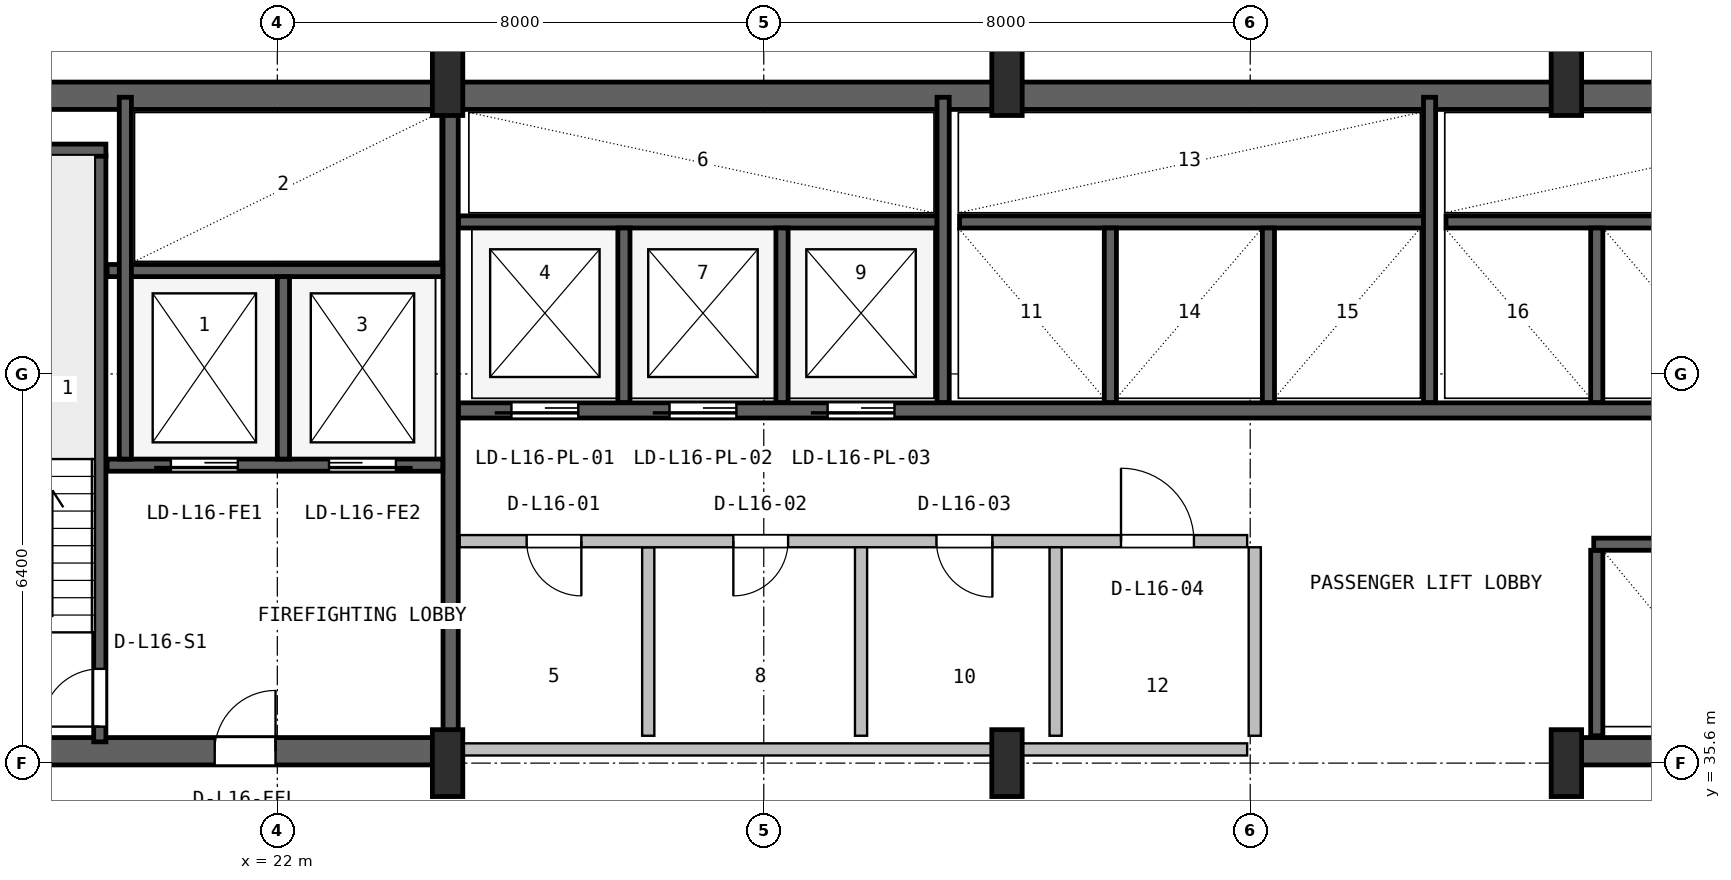
"""IFC4 building model, lengths in metres.
Left out: names, types, materials, properties, quantities, classifications, styles, units other than length and angle.
Written with IfcOpenShell. Run it as: python <this file> out.ifc"""

import sys

from ifc_helpers import new_model, si_unit, direction, frame, frame_2d, origin, origin_2d, place, context, subcontext, project, spatial, rectangle, i_section, extrude, source, transform, mapped, element, fill, save


model = new_model("IFC4")
c1 = context("Model", 3, precision=1e-05, world=origin(), true_north=direction((0.0, 1.0)))
c2 = subcontext(c1, "Body", "Model", "MODEL_VIEW")
j1 = project(units=[si_unit("LENGTHUNIT", "METRE"), si_unit("PLANEANGLEUNIT", "RADIAN")], contexts=[c1])
p1 = place(None, origin())
s1 = spatial("IfcSite", under=j1, at=p1, CompositionType="ELEMENT")
p2 = place(p1, origin())
s2 = spatial("IfcBuilding", under=s1, at=p2, CompositionType="ELEMENT")
p3 = place(p2, frame((0.0, 0.0, 70.5)))
s3 = spatial("IfcBuildingStorey", under=s2, at=p3, CompositionType="ELEMENT", Elevation=70.5)
p4 = place(p3, frame((15.6, 46.575, 0.0), z_axis=(0.0, 0.0, 1.0), x_axis=(1.0, 0.0, 0.0)))
e1 = element("IfcWall", 1, at=p4, inside=s3, PredefinedType="SHEAR", context=c2, shape_type="SweptSolid", body=[
    extrude(rectangle(XDim=36.8, YDim=0.45, at=frame_2d((18.4, 0.0))), origin(), (0.0, 0.0, 1.0), 3.65),
])
p5 = place(p3, frame((15.57, 35.795, 0.0), z_axis=(0.0, 0.0, 1.0), x_axis=(1.0, 0.0, 0.0)))
e2 = element("IfcWall", 2, at=p5, inside=s3, PredefinedType="SHEAR", context=c2, shape_type="SweptSolid", body=[
    extrude(rectangle(XDim=9.23, YDim=0.45, at=frame_2d((4.615, 0.0))), origin(), (0.0, 0.0, 1.0), 3.65),
])
p6 = place(p5, frame((5.4, 0.0, 0.0)))
e3 = element("IfcOpeningElement", 3, at=p6, cuts=e2, PredefinedType="OPENING", context=c2, shape_type="SweptSolid", body=[
    extrude(rectangle(XDim=1.0, YDim=2.1, at=frame_2d((0.5, 1.05))), frame((0.0, 0.235, 0.0), z_axis=(0.0, -1.0, 0.0), x_axis=(1.0, 0.0, 0.0)), (0.0, 0.0, 1.0), 0.47),
])
p7 = place(p3, frame((43.2, 35.795, 0.0), z_axis=(0.0, 0.0, 1.0), x_axis=(1.0, 0.0, 0.0)))
e4 = element("IfcWall", 4, at=p7, inside=s3, PredefinedType="SHEAR", context=c2, shape_type="SweptSolid", body=[
    extrude(rectangle(XDim=9.23, YDim=0.45, at=frame_2d((4.615, 0.0))), origin(), (0.0, 0.0, 1.0), 3.65),
])
p8 = place(p7, frame((6.25, 0.0, 0.0)))
e5 = element("IfcOpeningElement", 5, at=p8, cuts=e4, PredefinedType="OPENING", context=c2, shape_type="SweptSolid", body=[
    extrude(rectangle(XDim=0.95, YDim=2.1, at=frame_2d((0.475, 1.05))), frame((0.0, 0.235, 0.0), z_axis=(0.0, -1.0, 0.0), x_axis=(1.0, 0.0, 0.0)), (0.0, 0.0, 1.0), 0.47),
])
m1 = source(origin(), c2, "Body", "SweptSolid", [
    extrude(i_section(OverallWidth=0.5, OverallDepth=1.1, WebThickness=0.018, FlangeThickness=0.032, FilletRadius=0.018, at=origin_2d()), origin(), (0.0, 0.0, 1.0), 3.9),
])
for number, where, z_axis, x_axis in (
    (6, (24.8, 35.6, 0.0), (0.0, 0.0, 1.0), (1.0, 0.0, 0.0)),
    (7, (24.8, 46.8, 0.0), (0.0, 0.0, 1.0), (1.0, 0.0, 0.0)),
    (8, (34.0, 35.6, 0.0), (0.0, 0.0, 1.0), (1.0, 0.0, 0.0)),
    (9, (34.0, 46.8, 0.0), (0.0, 0.0, 1.0), (1.0, 0.0, 0.0)),
    (10, (43.2, 35.6, 0.0), (0.0, 0.0, 1.0), (1.0, 0.0, 0.0)),
    (11, (43.2, 46.8, 0.0), (0.0, 0.0, 1.0), (1.0, 0.0, 0.0)),
):
    element("IfcColumn", number, at=place(p3, frame(where, z_axis=z_axis, x_axis=x_axis)), inside=s3, PredefinedType="COLUMN", context=c2, shape_type="MappedRepresentation", body=[
        mapped(m1, transform((0.0, 0.0, 0.0), x_axis=(1.0, 0.0, 0.0), y_axis=(0.0, 1.0, 0.0), z_axis=(0.0, 0.0, 1.0), scale=1.0)),
    ])
p9 = place(p3, frame((19.08, 35.95, 0.0), z_axis=(0.0, 0.0, 1.0), x_axis=(0.0, 1.0, 0.0)))
e12 = element("IfcWall", 12, at=p9, inside=s3, PredefinedType="SHEAR", context=c2, shape_type="SweptSolid", body=[
    extrude(rectangle(XDim=9.65, YDim=0.2, at=frame_2d((4.825, 0.0))), origin(), (0.0, 0.0, 1.0), 3.65),
])
p10 = place(p9, frame((0.25, 0.0, 0.0)))
e13 = element("IfcOpeningElement", 13, at=p10, cuts=e12, PredefinedType="OPENING", context=c2, shape_type="SweptSolid", body=[
    extrude(rectangle(XDim=0.95, YDim=2.1, at=frame_2d((0.475, 1.05))), frame((0.0, 0.11, 0.0), z_axis=(0.0, -1.0, 0.0), x_axis=(1.0, 0.0, 0.0)), (0.0, 0.0, 1.0), 0.22),
])
p11 = place(p3, frame((15.95, 45.68, 0.0), z_axis=(0.0, 0.0, 1.0), x_axis=(1.0, 0.0, 0.0)))
e14 = element("IfcWall", 14, at=p11, inside=s3, PredefinedType="SHEAR", context=c2, shape_type="SweptSolid", body=[
    extrude(rectangle(XDim=3.23, YDim=0.2, at=frame_2d((1.615, 0.0))), origin(), (0.0, 0.0, 1.0), 3.65),
])
p12 = place(p3, frame((24.85, 36.05, 0.0), z_axis=(0.0, 0.0, 1.0), x_axis=(0.0, 1.0, 0.0)))
e15 = element("IfcWall", 15, at=p12, inside=s3, PredefinedType="SHEAR", context=c2, shape_type="SweptSolid", body=[
    extrude(rectangle(XDim=10.45, YDim=0.25, at=frame_2d((5.225, 0.0))), origin(), (0.0, 0.0, 1.0), 3.65),
])
p13 = place(p3, frame((19.2, 40.5, 0.0), z_axis=(0.0, 0.0, 1.0), x_axis=(1.0, 0.0, 0.0)))
e16 = element("IfcWall", 16, at=p13, inside=s3, PredefinedType="SHEAR", context=c2, shape_type="SweptSolid", body=[
    extrude(rectangle(XDim=5.52, YDim=0.2, at=frame_2d((2.76, 0.0))), origin(), (0.0, 0.0, 1.0), 3.65),
])
p14 = place(p13, frame((1.05, 0.0, 0.0)))
e17 = element("IfcOpeningElement", 17, at=p14, cuts=e16, PredefinedType="OPENING", context=c2, shape_type="SweptSolid", body=[
    extrude(rectangle(XDim=1.1, YDim=2.18, at=frame_2d((0.55, 1.09))), frame((0.0, 0.11, 0.0), z_axis=(0.0, -1.0, 0.0), x_axis=(1.0, 0.0, 0.0)), (0.0, 0.0, 1.0), 0.22),
])
p15 = place(p13, frame((3.65, 0.0, 0.0)))
e18 = element("IfcOpeningElement", 18, at=p15, cuts=e16, PredefinedType="OPENING", context=c2, shape_type="SweptSolid", body=[
    extrude(rectangle(XDim=1.1, YDim=2.18, at=frame_2d((0.55, 1.09))), frame((0.0, 0.11, 0.0), z_axis=(0.0, -1.0, 0.0), x_axis=(1.0, 0.0, 0.0)), (0.0, 0.0, 1.0), 0.22),
])
p16 = place(p3, frame((19.2, 43.7, 0.0), z_axis=(0.0, 0.0, 1.0), x_axis=(1.0, 0.0, 0.0)))
e19 = element("IfcWall", 19, at=p16, inside=s3, PredefinedType="SHEAR", context=c2, shape_type="SweptSolid", body=[
    extrude(rectangle(XDim=5.52, YDim=0.2, at=frame_2d((2.76, 0.0))), origin(), (0.0, 0.0, 1.0), 3.65),
])
p17 = place(p3, frame((22.1, 40.6, 0.0), z_axis=(0.0, 0.0, 1.0), x_axis=(0.0, 1.0, 0.0)))
e20 = element("IfcWall", 20, at=p17, inside=s3, PredefinedType="SHEAR", context=c2, shape_type="SweptSolid", body=[
    extrude(rectangle(XDim=3.0, YDim=0.2, at=frame_2d((1.5, 0.0))), origin(), (0.0, 0.0, 1.0), 3.65),
])
p18 = place(p3, frame((19.5, 40.6, 0.0), z_axis=(0.0, 0.0, 1.0), x_axis=(0.0, 1.0, 0.0)))
e21 = element("IfcWall", 21, at=p18, inside=s3, PredefinedType="SHEAR", context=c2, shape_type="SweptSolid", body=[
    extrude(rectangle(XDim=5.95, YDim=0.2, at=frame_2d((2.975, 0.0))), origin(), (0.0, 0.0, 1.0), 3.65),
])
p19 = place(p3, frame((24.98, 41.4, 0.0), z_axis=(0.0, 0.0, 1.0), x_axis=(1.0, 0.0, 0.0)))
e22 = element("IfcWall", 22, at=p19, inside=s3, PredefinedType="SHEAR", context=c2, shape_type="SweptSolid", body=[
    extrude(rectangle(XDim=23.82, YDim=0.25, at=frame_2d((11.91, 0.0))), origin(), (0.0, 0.0, 1.0), 3.65),
])
p20 = place(p19, frame((0.87, 0.0, 0.0)))
e23 = element("IfcOpeningElement", 23, at=p20, cuts=e22, PredefinedType="OPENING", context=c2, shape_type="SweptSolid", body=[
    extrude(rectangle(XDim=1.1, YDim=2.18, at=frame_2d((0.55, 1.09))), frame((0.0, 0.135, 0.0), z_axis=(0.0, -1.0, 0.0), x_axis=(1.0, 0.0, 0.0)), (0.0, 0.0, 1.0), 0.27),
])
p21 = place(p19, frame((3.47, 0.0, 0.0)))
e24 = element("IfcOpeningElement", 24, at=p21, cuts=e22, PredefinedType="OPENING", context=c2, shape_type="SweptSolid", body=[
    extrude(rectangle(XDim=1.1, YDim=2.18, at=frame_2d((0.55, 1.09))), frame((0.0, 0.135, 0.0), z_axis=(0.0, -1.0, 0.0), x_axis=(1.0, 0.0, 0.0)), (0.0, 0.0, 1.0), 0.27),
])
p22 = place(p19, frame((6.07, 0.0, 0.0)))
e25 = element("IfcOpeningElement", 25, at=p22, cuts=e22, PredefinedType="OPENING", context=c2, shape_type="SweptSolid", body=[
    extrude(rectangle(XDim=1.1, YDim=2.18, at=frame_2d((0.55, 1.09))), frame((0.0, 0.135, 0.0), z_axis=(0.0, -1.0, 0.0), x_axis=(1.0, 0.0, 0.0)), (0.0, 0.0, 1.0), 0.27),
])
p23 = place(p3, frame((24.98, 44.5, 0.0), z_axis=(0.0, 0.0, 1.0), x_axis=(1.0, 0.0, 0.0)))
e26 = element("IfcWall", 26, at=p23, inside=s3, PredefinedType="SHEAR", context=c2, shape_type="SweptSolid", body=[
    extrude(rectangle(XDim=7.87, YDim=0.2, at=frame_2d((3.935, 0.0))), origin(), (0.0, 0.0, 1.0), 3.65),
])
for number, where, z_axis, x_axis in (
    (27, (27.7, 41.53, 0.0), (0.0, 0.0, 1.0), (0.0, 1.0, 0.0)),
    (28, (30.3, 41.53, 0.0), (0.0, 0.0, 1.0), (0.0, 1.0, 0.0)),
):
    element("IfcWall", number, at=place(p3, frame(where, z_axis=z_axis, x_axis=x_axis)), inside=s3, PredefinedType="SHEAR", context=c2, shape_type="SweptSolid", body=[
        extrude(rectangle(XDim=2.87, YDim=0.2, at=frame_2d((1.435, 0.0))), origin(), (0.0, 0.0, 1.0), 3.65),
    ])
p24 = place(p3, frame((32.95, 41.53, 0.0), z_axis=(0.0, 0.0, 1.0), x_axis=(0.0, 1.0, 0.0)))
e29 = element("IfcWall", 29, at=p24, inside=s3, PredefinedType="SHEAR", context=c2, shape_type="SweptSolid", body=[
    extrude(rectangle(XDim=5.02, YDim=0.2, at=frame_2d((2.51, 0.0))), origin(), (0.0, 0.0, 1.0), 3.65),
])
p25 = place(p3, frame((33.22, 44.5, 0.0), z_axis=(0.0, 0.0, 1.0), x_axis=(1.0, 0.0, 0.0)))
e30 = element("IfcWall", 30, at=p25, inside=s3, PredefinedType="SHEAR", context=c2, shape_type="SweptSolid", body=[
    extrude(rectangle(XDim=7.63, YDim=0.2, at=frame_2d((3.815, 0.0))), origin(), (0.0, 0.0, 1.0), 3.65),
])
for number, where, z_axis, x_axis in (
    (31, (35.7, 41.53, 0.0), (0.0, 0.0, 1.0), (0.0, 1.0, 0.0)),
    (32, (38.3, 41.53, 0.0), (0.0, 0.0, 1.0), (0.0, 1.0, 0.0)),
):
    element("IfcWall", number, at=place(p3, frame(where, z_axis=z_axis, x_axis=x_axis)), inside=s3, PredefinedType="SHEAR", context=c2, shape_type="SweptSolid", body=[
        extrude(rectangle(XDim=2.87, YDim=0.2, at=frame_2d((1.435, 0.0))), origin(), (0.0, 0.0, 1.0), 3.65),
    ])
p26 = place(p3, frame((40.95, 41.53, 0.0), z_axis=(0.0, 0.0, 1.0), x_axis=(0.0, 1.0, 0.0)))
e33 = element("IfcWall", 33, at=p26, inside=s3, PredefinedType="SHEAR", context=c2, shape_type="SweptSolid", body=[
    extrude(rectangle(XDim=5.02, YDim=0.2, at=frame_2d((2.51, 0.0))), origin(), (0.0, 0.0, 1.0), 3.65),
])
p27 = place(p3, frame((41.22, 44.5, 0.0), z_axis=(0.0, 0.0, 1.0), x_axis=(1.0, 0.0, 0.0)))
e34 = element("IfcWall", 34, at=p27, inside=s3, PredefinedType="SHEAR", context=c2, shape_type="SweptSolid", body=[
    extrude(rectangle(XDim=7.58, YDim=0.2, at=frame_2d((3.79, 0.0))), origin(), (0.0, 0.0, 1.0), 3.65),
])
p28 = place(p3, frame((43.7, 41.53, 0.0), z_axis=(0.0, 0.0, 1.0), x_axis=(0.0, 1.0, 0.0)))
e35 = element("IfcWall", 35, at=p28, inside=s3, PredefinedType="SHEAR", context=c2, shape_type="SweptSolid", body=[
    extrude(rectangle(XDim=2.87, YDim=0.2, at=frame_2d((1.435, 0.0))), origin(), (0.0, 0.0, 1.0), 3.65),
])
p29 = place(p3, frame((43.7, 36.05, 0.0), z_axis=(0.0, 0.0, 1.0), x_axis=(0.0, 1.0, 0.0)))
e36 = element("IfcWall", 36, at=p29, inside=s3, PredefinedType="SHEAR", context=c2, shape_type="SweptSolid", body=[
    extrude(rectangle(XDim=3.05, YDim=0.2, at=frame_2d((1.525, 0.0))), origin(), (0.0, 0.0, 1.0), 3.65),
])
p30 = place(p3, frame((43.65, 39.2, 0.0), z_axis=(0.0, 0.0, 1.0), x_axis=(1.0, 0.0, 0.0)))
e37 = element("IfcWall", 37, at=p30, inside=s3, PredefinedType="SHEAR", context=c2, shape_type="SweptSolid", body=[
    extrude(rectangle(XDim=5.15, YDim=0.2, at=frame_2d((2.575, 0.0))), origin(), (0.0, 0.0, 1.0), 3.65),
])
p31 = place(p3, frame((25.0, 35.825, 0.0), z_axis=(0.0, 0.0, 1.0), x_axis=(1.0, 0.0, 0.0)))
e38 = element("IfcWall", 38, at=p31, inside=s3, PredefinedType="SOLIDWALL", context=c2, shape_type="SweptSolid", body=[
    extrude(rectangle(XDim=12.95, YDim=0.2, at=frame_2d((6.475, 0.0))), origin(), (0.0, 0.0, 1.0), 2.425),
])
p32 = place(p3, frame((28.1, 36.05, 0.0), z_axis=(0.0, 0.0, 1.0), x_axis=(0.0, 1.0, 0.0)))
e39 = element("IfcWall", 39, at=p32, inside=s3, PredefinedType="PLUMBINGWALL", context=c2, shape_type="SweptSolid", body=[
    extrude(rectangle(XDim=3.1, YDim=0.2, at=frame_2d((1.55, 0.0))), origin(), (0.0, 0.0, 1.0), 3.63),
])
p33 = place(p3, frame((25.0, 39.25, 0.0), z_axis=(0.0, 0.0, 1.0), x_axis=(1.0, 0.0, 0.0)))
e40 = element("IfcWall", 40, at=p33, inside=s3, PredefinedType="SOLIDWALL", context=c2, shape_type="SweptSolid", body=[
    extrude(rectangle(XDim=12.95, YDim=0.2, at=frame_2d((6.475, 0.0))), origin(), (0.0, 0.0, 1.0), 3.63),
])
p34 = place(p33, frame((1.1, 0.0, 0.0)))
e41 = element("IfcOpeningElement", 41, at=p34, cuts=e40, PredefinedType="OPENING", context=c2, shape_type="SweptSolid", body=[
    extrude(rectangle(XDim=0.9, YDim=2.06, at=frame_2d((0.45, 1.03))), frame((0.0, 0.11, 0.0), z_axis=(0.0, -1.0, 0.0), x_axis=(1.0, 0.0, 0.0)), (0.0, 0.0, 1.0), 0.22),
])
p35 = place(p33, frame((4.5, 0.0, 0.0)))
e42 = element("IfcOpeningElement", 42, at=p35, cuts=e40, PredefinedType="OPENING", context=c2, shape_type="SweptSolid", body=[
    extrude(rectangle(XDim=0.9, YDim=2.06, at=frame_2d((0.45, 1.03))), frame((0.0, 0.11, 0.0), z_axis=(0.0, -1.0, 0.0), x_axis=(1.0, 0.0, 0.0)), (0.0, 0.0, 1.0), 0.22),
])
p36 = place(p33, frame((7.84, 0.0, 0.0)))
e43 = element("IfcOpeningElement", 43, at=p36, cuts=e40, PredefinedType="OPENING", context=c2, shape_type="SweptSolid", body=[
    extrude(rectangle(XDim=0.92, YDim=2.08, at=frame_2d((0.46, 1.04))), frame((0.0, 0.11, 0.0), z_axis=(0.0, -1.0, 0.0), x_axis=(1.0, 0.0, 0.0)), (0.0, 0.0, 1.0), 0.22),
])
p37 = place(p33, frame((10.875, 0.0, 0.0)))
e44 = element("IfcOpeningElement", 44, at=p37, cuts=e40, PredefinedType="OPENING", context=c2, shape_type="SweptSolid", body=[
    extrude(rectangle(XDim=1.2, YDim=2.1, at=frame_2d((0.6, 1.05))), frame((0.0, 0.11, 0.0), z_axis=(0.0, -1.0, 0.0), x_axis=(1.0, 0.0, 0.0)), (0.0, 0.0, 1.0), 0.22),
])
p38 = place(p3, frame((31.6, 36.05, 0.0), z_axis=(0.0, 0.0, 1.0), x_axis=(0.0, 1.0, 0.0)))
e45 = element("IfcWall", 45, at=p38, inside=s3, PredefinedType="PLUMBINGWALL", context=c2, shape_type="SweptSolid", body=[
    extrude(rectangle(XDim=3.1, YDim=0.2, at=frame_2d((1.55, 0.0))), origin(), (0.0, 0.0, 1.0), 3.63),
])
for number, where, z_axis, x_axis in (
    (46, (34.8, 36.05, 0.0), (0.0, 0.0, 1.0), (0.0, 1.0, 0.0)),
    (47, (38.075, 36.05, 0.0), (0.0, 0.0, 1.0), (0.0, 1.0, 0.0)),
):
    element("IfcWall", number, at=place(p3, frame(where, z_axis=z_axis, x_axis=x_axis)), inside=s3, PredefinedType="SOLIDWALL", context=c2, shape_type="SweptSolid", body=[
        extrude(rectangle(XDim=3.1, YDim=0.2, at=frame_2d((1.55, 0.0))), origin(), (0.0, 0.0, 1.0), 3.63),
    ])
m2 = source(origin(), c2, "Body", "SweptSolid", [
    extrude(rectangle(XDim=0.95, YDim=2.1, at=frame_2d((0.475, 1.05))), frame((0.0, 0.025, 0.0), z_axis=(0.0, -1.0, 0.0), x_axis=(1.0, 0.0, 0.0)), (0.0, 0.0, 1.0), 0.05),
])
p39 = place(p10, origin())
e48 = element("IfcDoor", 48, at=p39, inside=s3, OperationType="SINGLE_SWING_LEFT", PredefinedType="DOOR", context=c2, shape_type="MappedRepresentation", body=[
    mapped(m2, transform((0.0, 0.0, 0.0), x_axis=(1.0, 0.0, 0.0), y_axis=(0.0, 1.0, 0.0), z_axis=(0.0, 0.0, 1.0), scale=1.0)),
])
fill(e13, e48)
m3 = source(origin(), c2, "Body", "SweptSolid", [
    extrude(rectangle(XDim=1.0, YDim=2.1, at=frame_2d((0.5, 1.05))), frame((0.0, 0.025, 0.0), z_axis=(0.0, -1.0, 0.0), x_axis=(1.0, 0.0, 0.0)), (0.0, 0.0, 1.0), 0.05),
])
p40 = place(p6, origin())
e49 = element("IfcDoor", 49, at=p40, inside=s3, OperationType="SINGLE_SWING_RIGHT", PredefinedType="DOOR", context=c2, shape_type="MappedRepresentation", body=[
    mapped(m3, transform((0.0, 0.0, 0.0), x_axis=(1.0, 0.0, 0.0), y_axis=(0.0, 1.0, 0.0), z_axis=(0.0, 0.0, 1.0), scale=1.0)),
])
fill(e3, e49)
m4 = source(origin(), c2, "Body", "SweptSolid", [
    extrude(rectangle(XDim=1.1, YDim=2.18, at=frame_2d((0.55, 1.09))), frame((0.0, 0.025, 0.0), z_axis=(0.0, -1.0, 0.0), x_axis=(1.0, 0.0, 0.0)), (0.0, 0.0, 1.0), 0.05),
])
p41 = place(p14, frame((1.1, 0.0, 0.0), z_axis=(0.0, 0.0, 1.0), x_axis=(-1.0, 0.0, 0.0)))
e50 = element("IfcDoor", 50, at=p41, inside=s3, OperationType="SLIDING_TO_LEFT", PredefinedType="DOOR", context=c2, shape_type="MappedRepresentation", body=[
    mapped(m4, transform((0.0, 0.0, 0.0), x_axis=(1.0, 0.0, 0.0), y_axis=(0.0, 1.0, 0.0), z_axis=(0.0, 0.0, 1.0), scale=1.0)),
])
fill(e17, e50)
p42 = place(p15, frame((1.1, 0.0, 0.0), z_axis=(0.0, 0.0, 1.0), x_axis=(-1.0, 0.0, 0.0)))
e51 = element("IfcDoor", 51, at=p42, inside=s3, OperationType="SLIDING_TO_RIGHT", PredefinedType="DOOR", context=c2, shape_type="MappedRepresentation", body=[
    mapped(m4, transform((0.0, 0.0, 0.0), x_axis=(1.0, 0.0, 0.0), y_axis=(0.0, 1.0, 0.0), z_axis=(0.0, 0.0, 1.0), scale=1.0)),
])
fill(e18, e51)
p43 = place(p20, frame((1.1, 0.0, 0.0), z_axis=(0.0, 0.0, 1.0), x_axis=(-1.0, 0.0, 0.0)))
e52 = element("IfcDoor", 52, at=p43, inside=s3, OperationType="SLIDING_TO_LEFT", PredefinedType="DOOR", context=c2, shape_type="MappedRepresentation", body=[
    mapped(m4, transform((0.0, 0.0, 0.0), x_axis=(1.0, 0.0, 0.0), y_axis=(0.0, 1.0, 0.0), z_axis=(0.0, 0.0, 1.0), scale=1.0)),
])
fill(e23, e52)
p44 = place(p21, frame((1.1, 0.0, 0.0), z_axis=(0.0, 0.0, 1.0), x_axis=(-1.0, 0.0, 0.0)))
e53 = element("IfcDoor", 53, at=p44, inside=s3, OperationType="SLIDING_TO_LEFT", PredefinedType="DOOR", context=c2, shape_type="MappedRepresentation", body=[
    mapped(m4, transform((0.0, 0.0, 0.0), x_axis=(1.0, 0.0, 0.0), y_axis=(0.0, 1.0, 0.0), z_axis=(0.0, 0.0, 1.0), scale=1.0)),
])
fill(e24, e53)
p45 = place(p22, frame((1.1, 0.0, 0.0), z_axis=(0.0, 0.0, 1.0), x_axis=(-1.0, 0.0, 0.0)))
e54 = element("IfcDoor", 54, at=p45, inside=s3, OperationType="SLIDING_TO_LEFT", PredefinedType="DOOR", context=c2, shape_type="MappedRepresentation", body=[
    mapped(m4, transform((0.0, 0.0, 0.0), x_axis=(1.0, 0.0, 0.0), y_axis=(0.0, 1.0, 0.0), z_axis=(0.0, 0.0, 1.0), scale=1.0)),
])
fill(e25, e54)
m5 = source(origin(), c2, "Body", "SweptSolid", [
    extrude(rectangle(XDim=0.9, YDim=2.06, at=frame_2d((0.45, 1.03))), frame((0.0, 0.025, 0.0), z_axis=(0.0, -1.0, 0.0), x_axis=(1.0, 0.0, 0.0)), (0.0, 0.0, 1.0), 0.05),
])
p46 = place(p34, frame((0.9, 0.0, 0.0), z_axis=(0.0, 0.0, 1.0), x_axis=(-1.0, 0.0, 0.0)))
e55 = element("IfcDoor", 55, at=p46, inside=s3, OperationType="SINGLE_SWING_RIGHT", PredefinedType="DOOR", context=c2, shape_type="MappedRepresentation", body=[
    mapped(m5, transform((0.0, 0.0, 0.0), x_axis=(1.0, 0.0, 0.0), y_axis=(0.0, 1.0, 0.0), z_axis=(0.0, 0.0, 1.0), scale=1.0)),
])
fill(e41, e55)
p47 = place(p35, frame((0.9, 0.0, 0.0), z_axis=(0.0, 0.0, 1.0), x_axis=(-1.0, 0.0, 0.0)))
e56 = element("IfcDoor", 56, at=p47, inside=s3, OperationType="SINGLE_SWING_LEFT", PredefinedType="DOOR", context=c2, shape_type="MappedRepresentation", body=[
    mapped(m5, transform((0.0, 0.0, 0.0), x_axis=(1.0, 0.0, 0.0), y_axis=(0.0, 1.0, 0.0), z_axis=(0.0, 0.0, 1.0), scale=1.0)),
])
fill(e42, e56)
m6 = source(origin(), c2, "Body", "SweptSolid", [
    extrude(rectangle(XDim=0.92, YDim=2.08, at=frame_2d((0.46, 1.04))), frame((0.0, 0.025, 0.0), z_axis=(0.0, -1.0, 0.0), x_axis=(1.0, 0.0, 0.0)), (0.0, 0.0, 1.0), 0.05),
])
p48 = place(p36, frame((0.92, 0.0, 0.0), z_axis=(0.0, 0.0, 1.0), x_axis=(-1.0, 0.0, 0.0)))
e57 = element("IfcDoor", 57, at=p48, inside=s3, OperationType="SINGLE_SWING_RIGHT", PredefinedType="DOOR", context=c2, shape_type="MappedRepresentation", body=[
    mapped(m6, transform((0.0, 0.0, 0.0), x_axis=(1.0, 0.0, 0.0), y_axis=(0.0, 1.0, 0.0), z_axis=(0.0, 0.0, 1.0), scale=1.0)),
])
fill(e43, e57)
m7 = source(origin(), c2, "Body", "SweptSolid", [
    extrude(rectangle(XDim=1.2, YDim=2.1, at=frame_2d((0.6, 1.05))), frame((0.0, 0.025, 0.0), z_axis=(0.0, -1.0, 0.0), x_axis=(1.0, 0.0, 0.0)), (0.0, 0.0, 1.0), 0.05),
])
p49 = place(p37, origin())
e58 = element("IfcDoor", 58, at=p49, inside=s3, OperationType="SINGLE_SWING_LEFT", PredefinedType="DOOR", context=c2, shape_type="MappedRepresentation", body=[
    mapped(m7, transform((0.0, 0.0, 0.0), x_axis=(1.0, 0.0, 0.0), y_axis=(0.0, 1.0, 0.0), z_axis=(0.0, 0.0, 1.0), scale=1.0)),
])
fill(e44, e58)
save(model, sys.argv[1])
